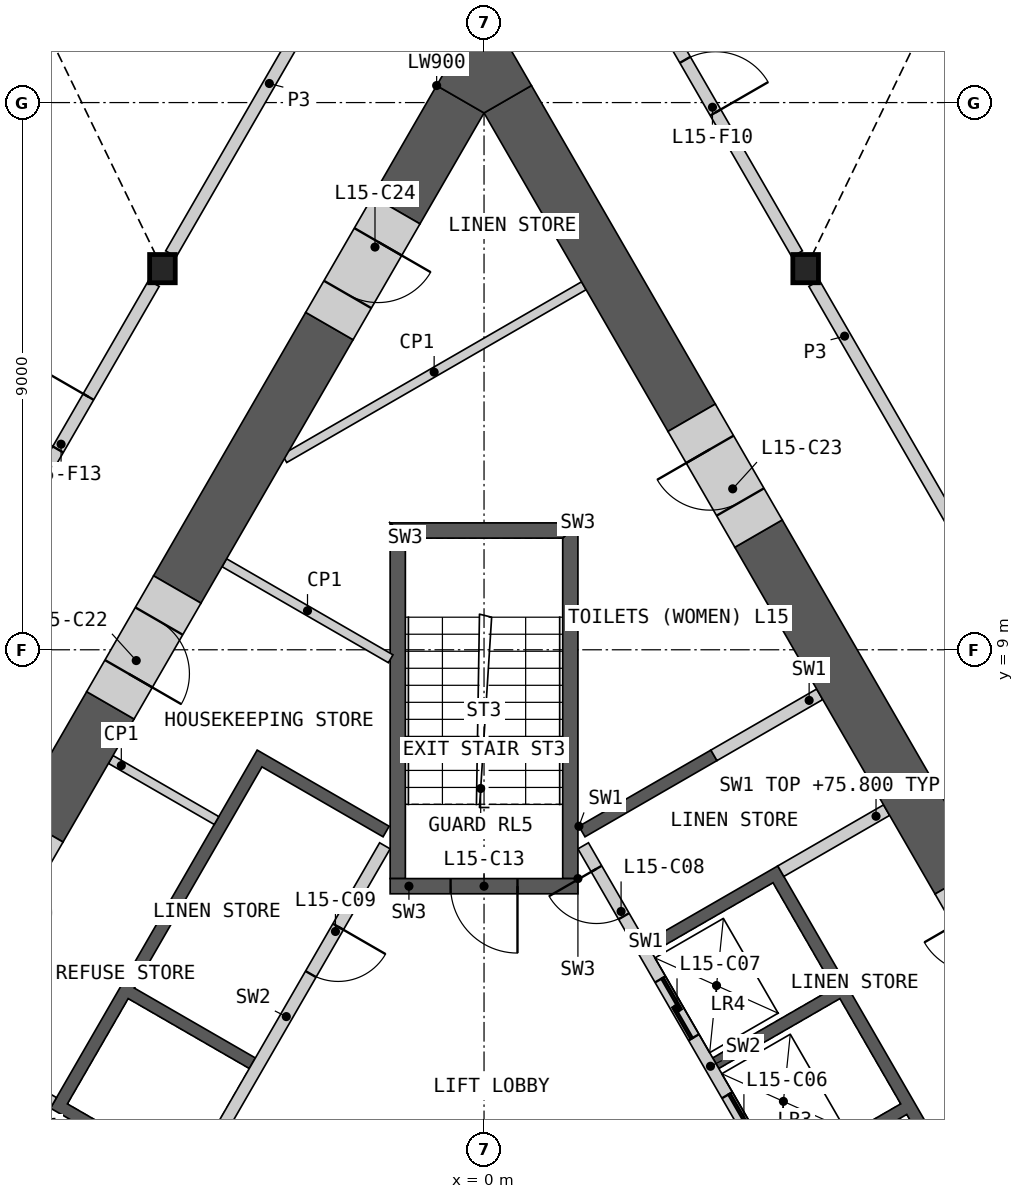
"""IFC4 building model, lengths in metres.
Left out: names, types, materials, properties, quantities, classifications, styles, units other than length and angle.
Written with IfcOpenShell. Run it as: python <this file> out.ifc"""

import sys

from ifc_helpers import new_model, si_unit, direction, frame, frame_2d, origin, origin_2d, place, context, subcontext, project, spatial, polyline, rectangle, i_section, outline, extrude, element, fill, save


model = new_model("IFC4")
c1 = context("Model", 3, precision=1e-05, world=origin(), true_north=direction((0.0, 1.0)))
c2 = subcontext(c1, "Body", "Model", "MODEL_VIEW")
j1 = project(units=[si_unit("LENGTHUNIT", "METRE"), si_unit("PLANEANGLEUNIT", "RADIAN")], contexts=[c1])
p1 = place(None, origin())
s1 = spatial("IfcSite", under=j1, at=p1, CompositionType="ELEMENT")
p2 = place(p1, origin())
s2 = spatial("IfcBuilding", under=s1, at=p2, CompositionType="ELEMENT")
p3 = place(p2, frame((0.0, 0.0, 72.0)))
s3 = spatial("IfcBuildingStorey", under=s2, at=p3, CompositionType="ELEMENT", Elevation=72.0)
for number, where, z_axis, x_axis in (
    (1, (-5.289, 15.269, 0.0), (0.0, 0.0, 1.0), (1.0, 0.0, 0.0)),
    (2, (5.289, 15.269, 0.0), (0.0, 0.0, 1.0), (1.0, 0.0, 0.0)),
):
    element("IfcColumn", number, at=place(p3, frame(where, z_axis=z_axis, x_axis=x_axis)), inside=s3, PredefinedType="COLUMN", context=c2, shape_type="SweptSolid", body=[
        extrude(i_section(OverallWidth=0.421, OverallDepth=0.465, WebThickness=0.045, FlangeThickness=0.072, at=origin_2d()), origin(), (0.0, 0.0, 1.0), 4.2),
    ])
p4 = place(p3, origin())
e3 = element("IfcWall", 3, at=p4, inside=s3, PredefinedType="SHEAR", context=c2, shape_type="SweptSolid", body=[
    extrude(outline(polyline([(1.561, 6.097), (3.731, 7.35), (3.831, 7.177), (1.66, 5.924), (1.561, 6.097)])), origin(), (0.0, 0.0, 1.0), 3.8),
])
p5 = place(p3, origin())
e4 = element("IfcWall", 4, at=p5, inside=s3, PredefinedType="SHEAR", context=c2, shape_type="SweptSolid", body=[
    extrude(outline(polyline([(2.66, 4.192), (4.831, 5.445), (8.231, -0.444), (6.061, -1.697), (5.96, -1.524), (7.952, -0.374), (6.952, 1.358), (4.96, 0.208), (4.861, 0.381), (6.852, 1.531), (5.852, 3.263), (3.861, 2.113), (3.76, 2.287), (5.752, 3.437), (4.752, 5.169), (2.76, 4.019), (2.66, 4.192)])), origin(), (0.0, 0.0, 1.0), 3.8),
])
p6 = place(p3, frame((5.817, -1.476, 0.0), z_axis=(0.0, 0.0, 1.0), x_axis=(-0.500002616675, 0.866023893041, 0.0)))
e5 = element("IfcWall", 5, at=p6, inside=s3, PredefinedType="SOLIDWALL", context=c2, shape_type="SweptSolid", body=[
    extrude(rectangle(XDim=8.373, YDim=0.2, at=frame_2d((4.187, 0.0))), origin(), (0.0, 0.0, 1.0), 3.8),
])
p7 = place(p6, frame((0.337, 0.0, 0.0)))
e6 = element("IfcOpeningElement", 6, at=p7, cuts=e5, PredefinedType="OPENING", context=c2, shape_type="SweptSolid", body=[
    extrude(rectangle(XDim=1.1, YDim=2.1, at=frame_2d((0.55, 1.05))), frame((0.0, 0.11, 0.0), z_axis=(0.0, -1.0, 0.0), x_axis=(1.0, 0.0, 0.0)), (0.0, 0.0, 1.0), 0.22),
])
p8 = place(p6, frame((2.537, 0.0, 0.0)))
e7 = element("IfcOpeningElement", 7, at=p8, cuts=e5, PredefinedType="OPENING", context=c2, shape_type="SweptSolid", body=[
    extrude(rectangle(XDim=1.1, YDim=2.1, at=frame_2d((0.55, 1.05))), frame((0.0, 0.11, 0.0), z_axis=(0.0, -1.0, 0.0), x_axis=(1.0, 0.0, 0.0)), (0.0, 0.0, 1.0), 0.22),
])
p9 = place(p6, frame((4.737, 0.0, 0.0)))
e8 = element("IfcOpeningElement", 8, at=p9, cuts=e5, PredefinedType="OPENING", context=c2, shape_type="SweptSolid", body=[
    extrude(rectangle(XDim=1.1, YDim=2.1, at=frame_2d((0.55, 1.05))), frame((0.0, 0.11, 0.0), z_axis=(0.0, -1.0, 0.0), x_axis=(1.0, 0.0, 0.0)), (0.0, 0.0, 1.0), 0.22),
])
p10 = place(p6, frame((7.037, 0.0, 0.0)))
e9 = element("IfcOpeningElement", 9, at=p10, cuts=e5, PredefinedType="OPENING", context=c2, shape_type="SweptSolid", body=[
    extrude(rectangle(XDim=0.9, YDim=2.1, at=frame_2d((0.45, 1.05))), frame((0.0, 0.11, 0.0), z_axis=(0.0, -1.0, 0.0), x_axis=(1.0, 0.0, 0.0)), (0.0, 0.0, 1.0), 0.22),
])
p11 = place(p3, frame((4.881, 5.358, 0.0), z_axis=(0.0, 0.0, 1.0), x_axis=(0.866035824272, 0.499981950752, 0.0)))
e10 = element("IfcWall", 10, at=p11, inside=s3, PredefinedType="SHEAR", context=c2, shape_type="SweptSolid", body=[
    extrude(rectangle(XDim=2.009, YDim=0.2, at=frame_2d((1.004, 0.0))), origin(), (0.0, 0.0, 1.0), 3.8),
])
p12 = place(p3, frame((3.781, 7.263, 0.0), z_axis=(0.0, 0.0, 1.0), x_axis=(0.865983199114, 0.50007309351, 0.0)))
e11 = element("IfcWall", 11, at=p12, inside=s3, PredefinedType="SHEAR", context=c2, shape_type="SweptSolid", body=[
    extrude(rectangle(XDim=2.009, YDim=0.2, at=frame_2d((1.004, 0.0))), origin(), (0.0, 0.0, 1.0), 3.8),
])
p13 = place(p3, origin())
e12 = element("IfcWall", 12, at=p13, inside=s3, PredefinedType="SHEAR", context=c2, shape_type="SweptSolid", body=[
    extrude(outline(polyline([(-4.96, 0.208), (-7.131, 1.461), (-3.731, 7.35), (-1.561, 6.097), (-1.66, 5.924), (-3.652, 7.074), (-5.752, 3.437), (-3.76, 2.287), (-3.861, 2.113), (-5.852, 3.263), (-6.852, 1.531), (-4.861, 0.381), (-4.96, 0.208)])), origin(), (0.0, 0.0, 1.0), 3.8),
])
p14 = place(p3, frame((-1.631, 5.776, 0.0), z_axis=(0.0, 0.0, 1.0), x_axis=(-0.499992876559, -0.866029516466, 0.0)))
e13 = element("IfcWall", 13, at=p14, inside=s3, PredefinedType="SOLIDWALL", context=c2, shape_type="SweptSolid", body=[
    extrude(rectangle(XDim=6.486, YDim=0.2, at=frame_2d((3.243, 0.0))), origin(), (0.0, 0.0, 1.0), 3.8),
])
p15 = place(p14, frame((1.537, 0.0, 0.0)))
e14 = element("IfcOpeningElement", 14, at=p15, cuts=e13, PredefinedType="OPENING", context=c2, shape_type="SweptSolid", body=[
    extrude(rectangle(XDim=0.9, YDim=2.1, at=frame_2d((0.45, 1.05))), frame((0.0, 0.11, 0.0), z_axis=(0.0, -1.0, 0.0), x_axis=(1.0, 0.0, 0.0)), (0.0, 0.0, 1.0), 0.22),
])
p16 = place(p3, frame((-7.081, 1.548, 0.0), z_axis=(0.0, 0.0, 1.0), x_axis=(-0.865983199114, 0.50007309351, 0.0)))
e15 = element("IfcWall", 15, at=p16, inside=s3, PredefinedType="SHEAR", context=c2, shape_type="SweptSolid", body=[
    extrude(rectangle(XDim=2.009, YDim=0.2, at=frame_2d((1.004, 0.0))), origin(), (0.0, 0.0, 1.0), 3.8),
])
p17 = place(p3, origin())
e16 = element("IfcWall", 16, at=p17, inside=s3, PredefinedType="SHEAR", context=c2, shape_type="SweptSolid", body=[
    extrude(outline(polyline([(1.544, 5.237), (1.544, 11.087), (1.294, 10.837), (1.294, 5.237), (1.544, 5.237)])), origin(), (0.0, 0.0, 1.0), 3.8),
])
p18 = place(p3, origin())
e17 = element("IfcWall", 17, at=p18, inside=s3, PredefinedType="SHEAR", context=c2, shape_type="SweptSolid", body=[
    extrude(outline(polyline([(1.544, 11.087), (-1.544, 11.087), (-1.294, 10.837), (1.294, 10.837), (1.544, 11.087)])), origin(), (0.0, 0.0, 1.0), 3.8),
])
p19 = place(p3, origin())
e18 = element("IfcWall", 18, at=p19, inside=s3, PredefinedType="SHEAR", context=c2, shape_type="SweptSolid", body=[
    extrude(outline(polyline([(-1.294, 10.837), (-1.544, 11.087), (-1.544, 5.237), (-1.294, 5.237), (-1.294, 10.837)])), origin(), (0.0, 0.0, 1.0), 3.8),
])
p20 = place(p3, frame((1.544, 5.112, 0.0), z_axis=(0.0, 0.0, 1.0), x_axis=(-1.0, 0.0, 0.0)))
e19 = element("IfcWall", 19, at=p20, inside=s3, PredefinedType="SHEAR", context=c2, shape_type="SweptSolid", body=[
    extrude(rectangle(XDim=3.088, YDim=0.25, at=frame_2d((1.544, 0.0))), origin(), (0.0, 0.0, 1.0), 3.8),
])
p21 = place(p20, frame((0.994, 0.0, 0.0)))
e20 = element("IfcOpeningElement", 20, at=p21, cuts=e19, PredefinedType="OPENING", context=c2, shape_type="SweptSolid", body=[
    extrude(rectangle(XDim=1.1, YDim=2.1, at=frame_2d((0.55, 1.05))), frame((0.0, 0.135, 0.0), z_axis=(0.0, -1.0, 0.0), x_axis=(1.0, 0.0, 0.0)), (0.0, 0.0, 1.0), 0.27),
])
for number, where, z_axis, x_axis in (
    (21, (-6.139, 7.196, 0.0), (0.0, 0.0, 1.0), (0.866, -0.5, 0.0)),
    (22, (9.302, 1.719, 0.0), (0.0, 0.0, 1.0), (-0.866, -0.5, 0.0)),
):
    element("IfcWall", number, at=place(p3, frame(where, z_axis=z_axis, x_axis=x_axis)), inside=s3, PredefinedType="PARTITIONING", context=c2, shape_type="SweptSolid", body=[
        extrude(rectangle(XDim=2.009, YDim=0.15, at=frame_2d((1.004, 0.0))), origin(), (0.0, 0.0, 1.0), 3.8),
    ])
p22 = place(p3, frame((-4.271, 10.432, 0.0), z_axis=(0.0, 0.0, 1.0), x_axis=(0.866018279777, -0.50001233894, 0.0)))
e23 = element("IfcWall", 23, at=p22, inside=s3, PredefinedType="PARTITIONING", context=c2, shape_type="SweptSolid", body=[
    extrude(rectangle(XDim=3.159, YDim=0.15, at=frame_2d((1.58, 0.0))), origin(), (0.0, 0.0, 1.0), 3.8),
])
p23 = place(p3, frame((1.641, 14.987, 0.0), z_axis=(0.0, 0.0, 1.0), x_axis=(-0.86602253128, -0.50000497529, 0.0)))
e24 = element("IfcWall", 24, at=p23, inside=s3, PredefinedType="PARTITIONING", context=c2, shape_type="SweptSolid", body=[
    extrude(rectangle(XDim=5.685, YDim=0.15, at=frame_2d((2.843, 0.0))), origin(), (0.0, 0.0, 1.0), 3.8),
])
p24 = place(p3, frame((7.807, 5.208, 0.0), z_axis=(0.0, 0.0, 1.0), x_axis=(-0.499986664161, 0.866033103098, 0.0)))
e25 = element("IfcWall", 25, at=p24, inside=s3, PredefinedType="SHEAR", context=c2, shape_type="SweptSolid", body=[
    extrude(rectangle(XDim=6.586, YDim=0.9, at=frame_2d((3.293, 0.0))), origin(), (0.0, 0.0, 1.0), 3.8),
])
p25 = place(p3, frame((3.414, 12.816, 0.0), z_axis=(0.0, 0.0, 1.0), x_axis=(-0.500006596359, 0.866021595341, 0.0)))
e26 = element("IfcWall", 26, at=p25, inside=s3, PredefinedType="SHEAR", context=c2, shape_type="SweptSolid", body=[
    extrude(rectangle(XDim=6.049, YDim=0.9, at=frame_2d((3.025, 0.0))), origin(), (0.0, 0.0, 1.0), 3.8),
])
p26 = place(p3, frame((-2.543, 14.325, 0.0), z_axis=(0.0, 0.0, 1.0), x_axis=(-0.500006859004, -0.866021443701, 0.0)))
e27 = element("IfcWall", 27, at=p26, inside=s3, PredefinedType="SHEAR", context=c2, shape_type="SweptSolid", body=[
    extrude(rectangle(XDim=5.003, YDim=0.9, at=frame_2d((2.502, 0.0))), origin(), (0.0, 0.0, 1.0), 3.8),
])
p27 = place(p3, frame((-6.145, 8.086, 0.0), z_axis=(0.0, 0.0, 1.0), x_axis=(-0.500026924946, -0.866009858102, 0.0)))
e28 = element("IfcWall", 28, at=p27, inside=s3, PredefinedType="SHEAR", context=c2, shape_type="SweptSolid", body=[
    extrude(rectangle(XDim=2.337, YDim=0.9, at=frame_2d((1.168, 0.0))), origin(), (0.0, 0.0, 1.0), 3.8),
])
p28 = place(p3, frame((-0.39, 18.055, 0.0), z_axis=(0.0, 0.0, 1.0), x_axis=(-0.500026652407, -0.866010015463, 0.0)))
e29 = element("IfcWall", 29, at=p28, inside=s3, PredefinedType="SHEAR", context=c2, shape_type="SweptSolid", body=[
    extrude(rectangle(XDim=2.107, YDim=0.9, at=frame_2d((1.054, 0.0))), origin(), (0.0, 0.0, 1.0), 3.8),
])
p29 = place(p3, origin())
e30 = element("IfcWall", 30, at=p29, inside=s3, PredefinedType="SHEAR", context=c2, shape_type="SweptSolid", body=[
    extrude(outline(polyline([(-0.779, 18.28), (0.0, 19.63), (0.779, 18.28), (0.0, 17.83), (-0.779, 18.28)])), origin(), (0.0, 0.0, 1.0), 3.8),
])
p30 = place(p3, frame((8.907, 3.302, 0.0), z_axis=(0.0, 0.0, 1.0), x_axis=(-0.50002983664, 0.866008176907, 0.0)))
e31 = element("IfcWall", 31, at=p30, inside=s3, PredefinedType="SHEAR", context=c2, shape_type="SweptSolid", body=[
    extrude(rectangle(XDim=2.2, YDim=0.9, at=frame_2d((1.1, 0.0))), origin(), (0.0, 0.0, 1.0), 3.8),
])
p31 = place(p30, frame((0.6, 0.0, 0.0)))
e32 = element("IfcOpeningElement", 32, at=p31, cuts=e31, PredefinedType="OPENING", context=c2, shape_type="SweptSolid", body=[
    extrude(rectangle(XDim=1.0, YDim=2.1, at=frame_2d((0.5, 1.05))), frame((0.0, 0.46, 0.0), z_axis=(0.0, -1.0, 0.0), x_axis=(1.0, 0.0, 0.0)), (0.0, 0.0, 1.0), 0.92),
])
p32 = place(p3, frame((-7.313, 6.062, 0.0), z_axis=(0.0, 0.0, 1.0), x_axis=(-0.500077893725, -0.86598042715, 0.0)))
e33 = element("IfcWall", 33, at=p32, inside=s3, PredefinedType="SHEAR", context=c2, shape_type="SweptSolid", body=[
    extrude(rectangle(XDim=2.2, YDim=0.9, at=frame_2d((1.1, 0.0))), origin(), (0.0, 0.0, 1.0), 3.8),
])
p33 = place(p32, frame((0.6, 0.0, 0.0)))
e34 = element("IfcOpeningElement", 34, at=p33, cuts=e33, PredefinedType="OPENING", context=c2, shape_type="SweptSolid", body=[
    extrude(rectangle(XDim=1.0, YDim=2.1, at=frame_2d((0.5, 1.05))), frame((0.0, 0.46, 0.0), z_axis=(0.0, -1.0, 0.0), x_axis=(1.0, 0.0, 0.0)), (0.0, 0.0, 1.0), 0.92),
])
p34 = place(p3, frame((-5.045, 9.992, 0.0), z_axis=(0.0, 0.0, 1.0), x_axis=(-0.499898558967, -0.866083962871, 0.0)))
e35 = element("IfcWall", 35, at=p34, inside=s3, PredefinedType="SHEAR", context=c2, shape_type="SweptSolid", body=[
    extrude(rectangle(XDim=2.2, YDim=0.9, at=frame_2d((1.1, 0.0))), origin(), (0.0, 0.0, 1.0), 3.8),
])
p35 = place(p34, frame((0.6, 0.0, 0.0)))
e36 = element("IfcOpeningElement", 36, at=p35, cuts=e35, PredefinedType="OPENING", context=c2, shape_type="SweptSolid", body=[
    extrude(rectangle(XDim=1.0, YDim=2.1, at=frame_2d((0.5, 1.05))), frame((0.0, 0.46, 0.0), z_axis=(0.0, -1.0, 0.0), x_axis=(1.0, 0.0, 0.0)), (0.0, 0.0, 1.0), 0.92),
])
p36 = place(p3, frame((4.514, 10.911, 0.0), z_axis=(0.0, 0.0, 1.0), x_axis=(-0.50002983664, 0.866008176907, 0.0)))
e37 = element("IfcWall", 37, at=p36, inside=s3, PredefinedType="SHEAR", context=c2, shape_type="SweptSolid", body=[
    extrude(rectangle(XDim=2.2, YDim=0.9, at=frame_2d((1.1, 0.0))), origin(), (0.0, 0.0, 1.0), 3.8),
])
p37 = place(p36, frame((0.6, 0.0, 0.0)))
e38 = element("IfcOpeningElement", 38, at=p37, cuts=e37, PredefinedType="OPENING", context=c2, shape_type="SweptSolid", body=[
    extrude(rectangle(XDim=1.0, YDim=2.1, at=frame_2d((0.5, 1.05))), frame((0.0, 0.46, 0.0), z_axis=(0.0, -1.0, 0.0), x_axis=(1.0, 0.0, 0.0)), (0.0, 0.0, 1.0), 0.92),
])
p38 = place(p3, frame((-1.443, 16.23, 0.0), z_axis=(0.0, 0.0, 1.0), x_axis=(-0.50002983664, -0.866008176907, 0.0)))
e39 = element("IfcWall", 39, at=p38, inside=s3, PredefinedType="SHEAR", context=c2, shape_type="SweptSolid", body=[
    extrude(rectangle(XDim=2.2, YDim=0.9, at=frame_2d((1.1, 0.0))), origin(), (0.0, 0.0, 1.0), 3.8),
])
p39 = place(p38, frame((0.6, 0.0, 0.0)))
e40 = element("IfcOpeningElement", 40, at=p39, cuts=e39, PredefinedType="OPENING", context=c2, shape_type="SweptSolid", body=[
    extrude(rectangle(XDim=1.0, YDim=2.1, at=frame_2d((0.5, 1.05))), frame((0.0, 0.46, 0.0), z_axis=(0.0, -1.0, 0.0), x_axis=(1.0, 0.0, 0.0)), (0.0, 0.0, 1.0), 0.92),
])
p40 = place(p3, frame((-10.439, 6.35, 0.0), z_axis=(0.0, 0.0, 1.0), x_axis=(0.50001002959, 0.86601961312, 0.0)))
e41 = element("IfcWall", 41, at=p40, inside=s3, PredefinedType="PARTITIONING", context=c2, shape_type="SweptSolid", body=[
    extrude(rectangle(XDim=10.019, YDim=0.2, at=frame_2d((5.009, 0.0))), origin(), (0.0, 0.0, 1.0), 3.8),
])
p41 = place(p40, frame((6.865, 0.0, 0.0)))
e42 = element("IfcOpeningElement", 42, at=p41, cuts=e41, PredefinedType="OPENING", context=c2, shape_type="SweptSolid", body=[
    extrude(rectangle(XDim=1.0, YDim=2.1, at=frame_2d((0.5, 1.05))), frame((0.0, 0.11, 0.0), z_axis=(0.0, -1.0, 0.0), x_axis=(1.0, 0.0, 0.0)), (0.0, 0.0, 1.0), 0.22),
])
p42 = place(p40, frame((1.854, 0.0, 0.0)))
e43 = element("IfcOpeningElement", 43, at=p42, cuts=e41, PredefinedType="OPENING", context=c2, shape_type="SweptSolid", body=[
    extrude(rectangle(XDim=1.0, YDim=2.1, at=frame_2d((0.5, 1.05))), frame((0.0, 0.11, 0.0), z_axis=(0.0, -1.0, 0.0), x_axis=(1.0, 0.0, 0.0)), (0.0, 0.0, 1.0), 0.22),
])
p43 = place(p3, frame((5.429, 15.026, 0.0), z_axis=(0.0, 0.0, 1.0), x_axis=(0.50001002959, -0.86601961312, 0.0)))
e44 = element("IfcWall", 44, at=p43, inside=s3, PredefinedType="PARTITIONING", context=c2, shape_type="SweptSolid", body=[
    extrude(rectangle(XDim=10.019, YDim=0.2, at=frame_2d((5.009, 0.0))), origin(), (0.0, 0.0, 1.0), 3.8),
])
p44 = place(p43, frame((7.165, 0.0, 0.0)))
e45 = element("IfcOpeningElement", 45, at=p44, cuts=e44, PredefinedType="OPENING", context=c2, shape_type="SweptSolid", body=[
    extrude(rectangle(XDim=1.0, YDim=2.1, at=frame_2d((0.5, 1.05))), frame((0.0, 0.11, 0.0), z_axis=(0.0, -1.0, 0.0), x_axis=(1.0, 0.0, 0.0)), (0.0, 0.0, 1.0), 0.22),
])
p45 = place(p3, frame((1.913, 21.116, 0.0), z_axis=(0.0, 0.0, 1.0), x_axis=(0.500001069878, -0.866024786089, 0.0)))
e46 = element("IfcWall", 46, at=p45, inside=s3, PredefinedType="PARTITIONING", context=c2, shape_type="SweptSolid", body=[
    extrude(rectangle(XDim=6.473, YDim=0.2, at=frame_2d((3.236, 0.0))), origin(), (0.0, 0.0, 1.0), 3.8),
])
p46 = place(p45, frame((2.787, 0.0, 0.0)))
e47 = element("IfcOpeningElement", 47, at=p46, cuts=e46, PredefinedType="OPENING", context=c2, shape_type="SweptSolid", body=[
    extrude(rectangle(XDim=1.0, YDim=2.1, at=frame_2d((0.5, 1.05))), frame((0.0, 0.11, 0.0), z_axis=(0.0, -1.0, 0.0), x_axis=(1.0, 0.0, 0.0)), (0.0, 0.0, 1.0), 0.22),
])
p47 = place(p3, frame((-5.149, 15.511, 0.0), z_axis=(0.0, 0.0, 1.0), x_axis=(0.500001069878, 0.866024786089, 0.0)))
e48 = element("IfcWall", 48, at=p47, inside=s3, PredefinedType="PARTITIONING", context=c2, shape_type="SweptSolid", body=[
    extrude(rectangle(XDim=6.473, YDim=0.2, at=frame_2d((3.236, 0.0))), origin(), (0.0, 0.0, 1.0), 3.8),
])
p48 = place(p47, frame((4.614, 0.0, 0.0)))
e49 = element("IfcOpeningElement", 49, at=p48, cuts=e48, PredefinedType="OPENING", context=c2, shape_type="SweptSolid", body=[
    extrude(rectangle(XDim=1.0, YDim=2.1, at=frame_2d((0.5, 1.05))), frame((0.0, 0.11, 0.0), z_axis=(0.0, -1.0, 0.0), x_axis=(1.0, 0.0, 0.0)), (0.0, 0.0, 1.0), 0.22),
])
p49 = place(p8, origin())
e50 = element("IfcDoor", 50, at=p49, inside=s3, OperationType="SLIDING_TO_LEFT", PredefinedType="DOOR", context=c2, shape_type="SweptSolid", body=[
    extrude(rectangle(XDim=1.1, YDim=2.1, at=frame_2d((0.55, 1.05))), frame((0.0, 0.025, 0.0), z_axis=(0.0, -1.0, 0.0), x_axis=(1.0, 0.0, 0.0)), (0.0, 0.0, 1.0), 0.05),
])
fill(e7, e50)
p50 = place(p9, origin())
e51 = element("IfcDoor", 51, at=p50, inside=s3, OperationType="SLIDING_TO_LEFT", PredefinedType="DOOR", context=c2, shape_type="SweptSolid", body=[
    extrude(rectangle(XDim=1.1, YDim=2.1, at=frame_2d((0.55, 1.05))), frame((0.0, 0.025, 0.0), z_axis=(0.0, -1.0, 0.0), x_axis=(1.0, 0.0, 0.0)), (0.0, 0.0, 1.0), 0.05),
])
fill(e8, e51)
p51 = place(p10, origin())
e52 = element("IfcDoor", 52, at=p51, inside=s3, OperationType="SINGLE_SWING_RIGHT", PredefinedType="DOOR", context=c2, shape_type="SweptSolid", body=[
    extrude(rectangle(XDim=0.9, YDim=2.1, at=frame_2d((0.45, 1.05))), frame((0.0, 0.025, 0.0), z_axis=(0.0, -1.0, 0.0), x_axis=(1.0, 0.0, 0.0)), (0.0, 0.0, 1.0), 0.05),
])
fill(e9, e52)
p52 = place(p15, origin())
e53 = element("IfcDoor", 53, at=p52, inside=s3, OperationType="SINGLE_SWING_LEFT", PredefinedType="DOOR", context=c2, shape_type="SweptSolid", body=[
    extrude(rectangle(XDim=0.9, YDim=2.1, at=frame_2d((0.45, 1.05))), frame((0.0, 0.025, 0.0), z_axis=(0.0, -1.0, 0.0), x_axis=(1.0, 0.0, 0.0)), (0.0, 0.0, 1.0), 0.05),
])
fill(e14, e53)
p53 = place(p21, origin())
e54 = element("IfcDoor", 54, at=p53, inside=s3, OperationType="SINGLE_SWING_LEFT", PredefinedType="DOOR", context=c2, shape_type="SweptSolid", body=[
    extrude(rectangle(XDim=1.1, YDim=2.1, at=frame_2d((0.55, 1.05))), frame((0.0, 0.025, 0.0), z_axis=(0.0, -1.0, 0.0), x_axis=(1.0, 0.0, 0.0)), (0.0, 0.0, 1.0), 0.05),
])
fill(e20, e54)
p54 = place(p35, origin())
e55 = element("IfcDoor", 55, at=p54, inside=s3, OperationType="SINGLE_SWING_RIGHT", PredefinedType="DOOR", context=c2, shape_type="SweptSolid", body=[
    extrude(rectangle(XDim=1.0, YDim=2.1, at=frame_2d((0.5, 1.05))), frame((0.0, 0.205, 0.0), z_axis=(0.0, -1.0, 0.0), x_axis=(1.0, 0.0, 0.0)), (0.0, 0.0, 1.0), 0.05),
])
fill(e36, e55)
p55 = place(p37, origin())
e56 = element("IfcDoor", 56, at=p55, inside=s3, OperationType="SINGLE_SWING_RIGHT", PredefinedType="DOOR", context=c2, shape_type="SweptSolid", body=[
    extrude(rectangle(XDim=1.0, YDim=2.1, at=frame_2d((0.5, 1.05))), frame((0.0, 0.205, 0.0), z_axis=(0.0, -1.0, 0.0), x_axis=(1.0, 0.0, 0.0)), (0.0, 0.0, 1.0), 0.05),
])
fill(e38, e56)
p56 = place(p39, origin())
e57 = element("IfcDoor", 57, at=p56, inside=s3, OperationType="SINGLE_SWING_LEFT", PredefinedType="DOOR", context=c2, shape_type="SweptSolid", body=[
    extrude(rectangle(XDim=1.0, YDim=2.1, at=frame_2d((0.5, 1.05))), frame((0.0, 0.205, 0.0), z_axis=(0.0, -1.0, 0.0), x_axis=(1.0, 0.0, 0.0)), (0.0, 0.0, 1.0), 0.05),
])
fill(e40, e57)
p57 = place(p46, origin())
e58 = element("IfcDoor", 58, at=p57, inside=s3, OperationType="SINGLE_SWING_RIGHT", PredefinedType="DOOR", context=c2, shape_type="SweptSolid", body=[
    extrude(rectangle(XDim=1.0, YDim=2.1, at=frame_2d((0.5, 1.05))), frame((0.0, 0.025, 0.0), z_axis=(0.0, -1.0, 0.0), x_axis=(1.0, 0.0, 0.0)), (0.0, 0.0, 1.0), 0.05),
])
fill(e47, e58)
p58 = place(p41, origin())
e59 = element("IfcDoor", 59, at=p58, inside=s3, OperationType="SINGLE_SWING_RIGHT", PredefinedType="DOOR", context=c2, shape_type="SweptSolid", body=[
    extrude(rectangle(XDim=1.0, YDim=2.1, at=frame_2d((0.5, 1.05))), frame((0.0, 0.025, 0.0), z_axis=(0.0, -1.0, 0.0), x_axis=(1.0, 0.0, 0.0)), (0.0, 0.0, 1.0), 0.05),
])
fill(e42, e59)
save(model, sys.argv[1])
